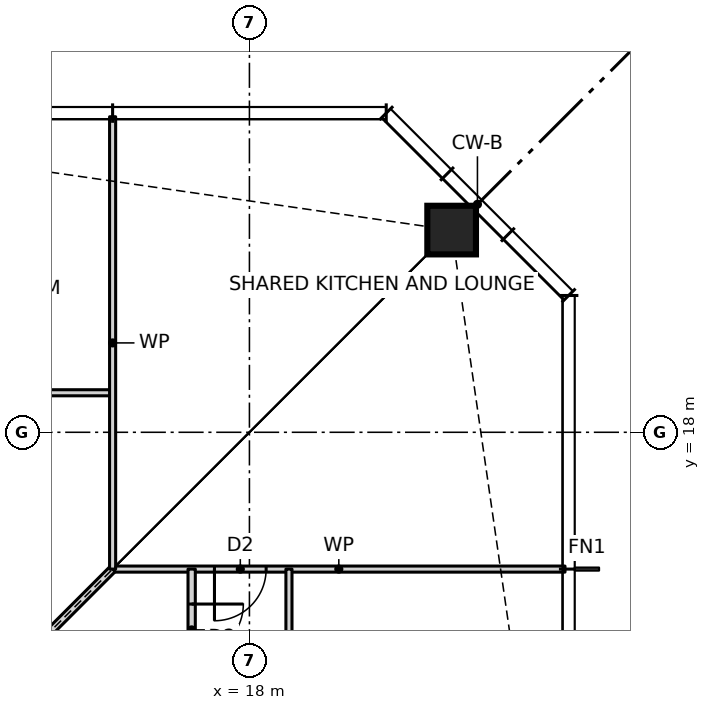
"""IFC4 building model, lengths in metres.
Left out: names, types, materials, properties, quantities, classifications, styles, units other than length and angle.
Written with IfcOpenShell. Run it as: python <this file> out.ifc"""

import sys

from ifc_helpers import new_model, si_unit, direction, frame, frame_2d, origin, origin_2d, place, context, subcontext, project, spatial, rectangle, hollow_rectangle, extrude, element, fill, save


model = new_model("IFC4")
c1 = context("Model", 3, precision=1e-05, world=origin(), true_north=direction((0.0, 1.0)))
c2 = subcontext(c1, "Body", "Model", "MODEL_VIEW")
j1 = project(units=[si_unit("LENGTHUNIT", "METRE"), si_unit("PLANEANGLEUNIT", "RADIAN")], contexts=[c1])
p1 = place(None, origin())
s1 = spatial("IfcSite", under=j1, at=p1, CompositionType="ELEMENT")
p2 = place(p1, origin())
s2 = spatial("IfcBuilding", under=s1, at=p2, CompositionType="ELEMENT")
p3 = place(p2, frame((0.0, 0.0, 53.5)))
s3 = spatial("IfcBuildingStorey", under=s2, at=p3, CompositionType="ELEMENT", Elevation=53.5)
p4 = place(p3, frame((21.326, 21.326, 0.0), z_axis=(0.0, 0.0, 1.0), x_axis=(1.0, 0.0, 0.0)))
e1 = element("IfcColumn", 1, at=p4, inside=s3, PredefinedType="COLUMN", context=c2, shape_type="SweptSolid", body=[
    extrude(hollow_rectangle(XDim=0.8, YDim=0.8, WallThickness=0.09, at=origin_2d()), origin(), (0.0, 0.0, 1.0), 3.5),
])
p5 = place(p3, frame((15.75, 15.75, 0.0), z_axis=(0.0, 0.0, 1.0), x_axis=(1.0, 0.0, 0.0)))
e2 = element("IfcWall", 2, at=p5, inside=s3, PredefinedType="PARTITIONING", context=c2, shape_type="SweptSolid", body=[
    extrude(rectangle(XDim=7.44, YDim=0.1, at=frame_2d((3.72, 0.0))), origin(), (0.0, 0.0, 1.0), 3.27),
])
p6 = place(p5, frame((1.675, 0.0, 0.0)))
e3 = element("IfcOpeningElement", 3, at=p6, cuts=e2, PredefinedType="OPENING", context=c2, shape_type="SweptSolid", body=[
    extrude(rectangle(XDim=0.85, YDim=2.1, at=frame_2d((0.425, 1.05))), frame((0.0, 0.06, 0.0), z_axis=(0.0, -1.0, 0.0), x_axis=(1.0, 0.0, 0.0)), (0.0, 0.0, 1.0), 0.12),
])
p7 = place(p3, frame((-11.25, 18.65, 0.0), z_axis=(0.0, 0.0, 1.0), x_axis=(1.0, 0.0, 0.0)))
e4 = element("IfcWall", 4, at=p7, inside=s3, PredefinedType="PARTITIONING", context=c2, shape_type="SweptSolid", body=[
    extrude(rectangle(XDim=27.0, YDim=0.1, at=frame_2d((13.5, 0.0))), origin(), (0.0, 0.0, 1.0), 3.27),
])
p8 = place(p7, frame((24.3, 0.0, 0.0)))
e5 = element("IfcOpeningElement", 5, at=p8, cuts=e4, PredefinedType="OPENING", context=c2, shape_type="SweptSolid", body=[
    extrude(rectangle(XDim=0.9, YDim=2.1, at=frame_2d((0.45, 1.05))), frame((0.0, 0.06, 0.0), z_axis=(0.0, -1.0, 0.0), x_axis=(1.0, 0.0, 0.0)), (0.0, 0.0, 1.0), 0.12),
])
p9 = place(p7, frame((19.8, 0.0, 0.0)))
e6 = element("IfcOpeningElement", 6, at=p9, cuts=e4, PredefinedType="OPENING", context=c2, shape_type="SweptSolid", body=[
    extrude(rectangle(XDim=0.9, YDim=2.1, at=frame_2d((0.45, 1.05))), frame((0.0, 0.06, 0.0), z_axis=(0.0, -1.0, 0.0), x_axis=(1.0, 0.0, 0.0)), (0.0, 0.0, 1.0), 0.12),
])
p10 = place(p7, frame((15.3, 0.0, 0.0)))
e7 = element("IfcOpeningElement", 7, at=p10, cuts=e4, PredefinedType="OPENING", context=c2, shape_type="SweptSolid", body=[
    extrude(rectangle(XDim=0.9, YDim=2.1, at=frame_2d((0.45, 1.05))), frame((0.0, 0.06, 0.0), z_axis=(0.0, -1.0, 0.0), x_axis=(1.0, 0.0, 0.0)), (0.0, 0.0, 1.0), 0.12),
])
p11 = place(p7, frame((10.8, 0.0, 0.0)))
e8 = element("IfcOpeningElement", 8, at=p11, cuts=e4, PredefinedType="OPENING", context=c2, shape_type="SweptSolid", body=[
    extrude(rectangle(XDim=0.9, YDim=2.1, at=frame_2d((0.45, 1.05))), frame((0.0, 0.06, 0.0), z_axis=(0.0, -1.0, 0.0), x_axis=(1.0, 0.0, 0.0)), (0.0, 0.0, 1.0), 0.12),
])
p12 = place(p7, frame((6.3, 0.0, 0.0)))
e9 = element("IfcOpeningElement", 9, at=p12, cuts=e4, PredefinedType="OPENING", context=c2, shape_type="SweptSolid", body=[
    extrude(rectangle(XDim=0.9, YDim=2.1, at=frame_2d((0.45, 1.05))), frame((0.0, 0.06, 0.0), z_axis=(0.0, -1.0, 0.0), x_axis=(1.0, 0.0, 0.0)), (0.0, 0.0, 1.0), 0.12),
])
p13 = place(p7, frame((1.8, 0.0, 0.0)))
e10 = element("IfcOpeningElement", 10, at=p13, cuts=e4, PredefinedType="OPENING", context=c2, shape_type="SweptSolid", body=[
    extrude(rectangle(XDim=0.9, YDim=2.1, at=frame_2d((0.45, 1.05))), frame((0.0, 0.06, 0.0), z_axis=(0.0, -1.0, 0.0), x_axis=(1.0, 0.0, 0.0)), (0.0, 0.0, 1.0), 0.12),
])
p14 = place(p3, frame((11.6, 11.6, 0.0), z_axis=(0.0, 0.0, 1.0), x_axis=(0.707106781187, 0.707106781187, 0.0)))
e11 = element("IfcWall", 11, at=p14, inside=s3, PredefinedType="PARTITIONING", context=c2, shape_type="SweptSolid", body=[
    extrude(rectangle(XDim=5.869, YDim=0.12, at=frame_2d((2.935, 0.0))), origin(), (0.0, 0.0, 1.0), 2.343),
])
p15 = place(p3, frame((18.65, -15.75, 0.0), z_axis=(0.0, 0.0, 1.0), x_axis=(0.0, 1.0, 0.0)))
e12 = element("IfcWall", 12, at=p15, inside=s3, PredefinedType="PARTITIONING", context=c2, shape_type="SweptSolid", body=[
    extrude(rectangle(XDim=31.5, YDim=0.1, at=frame_2d((15.75, 0.0))), origin(), (0.0, 0.0, 1.0), 3.27),
])
p16 = place(p15, frame((1.8, 0.0, 0.0)))
e13 = element("IfcOpeningElement", 13, at=p16, cuts=e12, PredefinedType="OPENING", context=c2, shape_type="SweptSolid", body=[
    extrude(rectangle(XDim=0.9, YDim=2.1, at=frame_2d((0.45, 1.05))), frame((0.0, 0.06, 0.0), z_axis=(0.0, -1.0, 0.0), x_axis=(1.0, 0.0, 0.0)), (0.0, 0.0, 1.0), 0.12),
])
p17 = place(p15, frame((6.3, 0.0, 0.0)))
e14 = element("IfcOpeningElement", 14, at=p17, cuts=e12, PredefinedType="OPENING", context=c2, shape_type="SweptSolid", body=[
    extrude(rectangle(XDim=0.9, YDim=2.1, at=frame_2d((0.45, 1.05))), frame((0.0, 0.06, 0.0), z_axis=(0.0, -1.0, 0.0), x_axis=(1.0, 0.0, 0.0)), (0.0, 0.0, 1.0), 0.12),
])
p18 = place(p15, frame((10.8, 0.0, 0.0)))
e15 = element("IfcOpeningElement", 15, at=p18, cuts=e12, PredefinedType="OPENING", context=c2, shape_type="SweptSolid", body=[
    extrude(rectangle(XDim=0.9, YDim=2.1, at=frame_2d((0.45, 1.05))), frame((0.0, 0.06, 0.0), z_axis=(0.0, -1.0, 0.0), x_axis=(1.0, 0.0, 0.0)), (0.0, 0.0, 1.0), 0.12),
])
p19 = place(p15, frame((15.3, 0.0, 0.0)))
e16 = element("IfcOpeningElement", 16, at=p19, cuts=e12, PredefinedType="OPENING", context=c2, shape_type="SweptSolid", body=[
    extrude(rectangle(XDim=0.9, YDim=2.1, at=frame_2d((0.45, 1.05))), frame((0.0, 0.06, 0.0), z_axis=(0.0, -1.0, 0.0), x_axis=(1.0, 0.0, 0.0)), (0.0, 0.0, 1.0), 0.12),
])
p20 = place(p15, frame((19.8, 0.0, 0.0)))
e17 = element("IfcOpeningElement", 17, at=p20, cuts=e12, PredefinedType="OPENING", context=c2, shape_type="SweptSolid", body=[
    extrude(rectangle(XDim=0.9, YDim=2.1, at=frame_2d((0.45, 1.05))), frame((0.0, 0.06, 0.0), z_axis=(0.0, -1.0, 0.0), x_axis=(1.0, 0.0, 0.0)), (0.0, 0.0, 1.0), 0.12),
])
p21 = place(p15, frame((24.3, 0.0, 0.0)))
e18 = element("IfcOpeningElement", 18, at=p21, cuts=e12, PredefinedType="OPENING", context=c2, shape_type="SweptSolid", body=[
    extrude(rectangle(XDim=0.9, YDim=2.1, at=frame_2d((0.45, 1.05))), frame((0.0, 0.06, 0.0), z_axis=(0.0, -1.0, 0.0), x_axis=(1.0, 0.0, 0.0)), (0.0, 0.0, 1.0), 0.12),
])
p22 = place(p15, frame((28.8, 0.0, 0.0)))
e19 = element("IfcOpeningElement", 19, at=p22, cuts=e12, PredefinedType="OPENING", context=c2, shape_type="SweptSolid", body=[
    extrude(rectangle(XDim=0.9, YDim=2.1, at=frame_2d((0.45, 1.05))), frame((0.0, 0.06, 0.0), z_axis=(0.0, -1.0, 0.0), x_axis=(1.0, 0.0, 0.0)), (0.0, 0.0, 1.0), 0.12),
])
p23 = place(p3, frame((17.05, 10.65, 0.0), z_axis=(0.0, 0.0, 1.0), x_axis=(0.0, 1.0, 0.0)))
e20 = element("IfcWall", 20, at=p23, inside=s3, PredefinedType="PARTITIONING", context=c2, shape_type="SweptSolid", body=[
    extrude(rectangle(XDim=5.1, YDim=0.12, at=frame_2d((2.55, 0.0))), origin(), (0.0, 0.0, 1.0), 3.27),
])
p24 = place(p23, frame((1.875, 0.0, 0.0)))
e21 = element("IfcOpeningElement", 21, at=p24, cuts=e20, PredefinedType="OPENING", context=c2, shape_type="SweptSolid", body=[
    extrude(rectangle(XDim=0.85, YDim=2.1, at=frame_2d((0.425, 1.05))), frame((0.0, 0.07, 0.0), z_axis=(0.0, -1.0, 0.0), x_axis=(1.0, 0.0, 0.0)), (0.0, 0.0, 1.0), 0.14),
])
p25 = place(p23, frame((3.675, 0.0, 0.0)))
e22 = element("IfcOpeningElement", 22, at=p25, cuts=e20, PredefinedType="OPENING", context=c2, shape_type="SweptSolid", body=[
    extrude(rectangle(XDim=0.85, YDim=2.1, at=frame_2d((0.425, 1.05))), frame((0.0, 0.07, 0.0), z_axis=(0.0, -1.0, 0.0), x_axis=(1.0, 0.0, 0.0)), (0.0, 0.0, 1.0), 0.14),
])
p26 = place(p3, frame((15.75, 15.75, 0.0), z_axis=(0.0, 0.0, 1.0), x_axis=(0.0, 1.0, 0.0)))
e23 = element("IfcWall", 23, at=p26, inside=s3, PredefinedType="PARTITIONING", context=c2, shape_type="SweptSolid", body=[
    extrude(rectangle(XDim=7.44, YDim=0.1, at=frame_2d((3.72, 0.0))), origin(), (0.0, 0.0, 1.0), 3.27),
])
p27 = place(p25, frame((0.85, 0.0, 0.0), z_axis=(0.0, 0.0, 1.0), x_axis=(-1.0, 0.0, 0.0)))
e24 = element("IfcDoor", 24, at=p27, inside=s3, OperationType="SINGLE_SWING_LEFT", PredefinedType="DOOR", context=c2, shape_type="SweptSolid", body=[
    extrude(rectangle(XDim=0.85, YDim=2.1, at=frame_2d((0.425, 1.05))), frame((0.0, 0.025, 0.0), z_axis=(0.0, -1.0, 0.0), x_axis=(1.0, 0.0, 0.0)), (0.0, 0.0, 1.0), 0.05),
])
fill(e22, e24)
p28 = place(p6, frame((0.85, 0.0, 0.0), z_axis=(0.0, 0.0, 1.0), x_axis=(-1.0, 0.0, 0.0)))
e25 = element("IfcDoor", 25, at=p28, inside=s3, OperationType="SINGLE_SWING_RIGHT", PredefinedType="DOOR", context=c2, shape_type="SweptSolid", body=[
    extrude(rectangle(XDim=0.85, YDim=2.1, at=frame_2d((0.425, 1.05))), frame((0.0, 0.025, 0.0), z_axis=(0.0, -1.0, 0.0), x_axis=(1.0, 0.0, 0.0)), (0.0, 0.0, 1.0), 0.05),
])
fill(e3, e25)
save(model, sys.argv[1])
